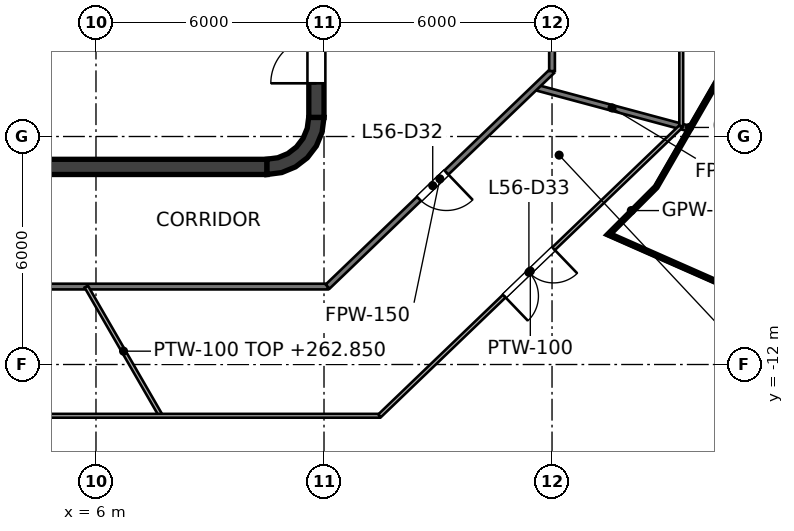
"""IFC4 building model, lengths in metres.
Left out: names, types, materials, properties, quantities, classifications, styles, units other than length and angle.
Written with IfcOpenShell. Run it as: python <this file> out.ifc"""

import sys

from ifc_helpers import new_model, si_unit, direction, frame, frame_2d, origin, place, context, subcontext, project, spatial, polyline, rectangle, outline, extrude, element, fill, save


model = new_model("IFC4")
c1 = context("Model", 3, precision=1e-05, world=origin(), true_north=direction((0.0, 1.0)))
c2 = subcontext(c1, "Body", "Model", "MODEL_VIEW")
j1 = project(units=[si_unit("LENGTHUNIT", "METRE"), si_unit("PLANEANGLEUNIT", "RADIAN")], contexts=[c1])
p1 = place(None, origin())
s1 = spatial("IfcSite", under=j1, at=p1, CompositionType="ELEMENT")
p2 = place(p1, origin())
s2 = spatial("IfcBuilding", under=s1, at=p2, CompositionType="ELEMENT")
p3 = place(p2, frame((0.0, 0.0, 259.0)))
s3 = spatial("IfcBuildingStorey", under=s2, at=p3, CompositionType="ELEMENT", Elevation=259.0)
p4 = place(p3, frame((-10.5, -6.8, 0.0), z_axis=(0.0, 0.0, 1.0), x_axis=(1.0, 0.0, 0.0)))
e1 = element("IfcWall", 1, at=p4, inside=s3, PredefinedType="SHEAR", context=c2, shape_type="SweptSolid", body=[
    extrude(rectangle(XDim=21.0, YDim=0.4, at=frame_2d((10.5, 0.0))), origin(), (0.0, 0.0, 1.0), 4.0),
])
p5 = place(p3, frame((11.8, -5.5, 0.0), z_axis=(0.0, 0.0, 1.0), x_axis=(0.0, 1.0, 0.0)))
e2 = element("IfcWall", 2, at=p5, inside=s3, PredefinedType="SHEAR", context=c2, shape_type="SweptSolid", body=[
    extrude(rectangle(XDim=11.0, YDim=0.4, at=frame_2d((5.5, 0.0))), origin(), (0.0, 0.0, 1.0), 4.0),
])
p6 = place(p5, frame((3.2, 0.0, 0.0)))
e3 = element("IfcOpeningElement", 3, at=p6, cuts=e2, PredefinedType="OPENING", context=c2, shape_type="SweptSolid", body=[
    extrude(rectangle(XDim=1.0, YDim=2.1, at=frame_2d((0.5, 1.05))), frame((0.0, 0.2, 0.0), z_axis=(0.0, -1.0, 0.0), x_axis=(1.0, 0.0, 0.0)), (0.0, 0.0, 1.0), 0.4),
])
p7 = place(p5, frame((6.1, 0.0, 0.0)))
e4 = element("IfcOpeningElement", 4, at=p7, cuts=e2, PredefinedType="OPENING", context=c2, shape_type="SweptSolid", body=[
    extrude(rectangle(XDim=1.0, YDim=2.1, at=frame_2d((0.5, 1.05))), frame((0.0, 0.2, 0.0), z_axis=(0.0, -1.0, 0.0), x_axis=(1.0, 0.0, 0.0)), (0.0, 0.0, 1.0), 0.4),
])
p8 = place(p5, frame((0.9, 0.0, 0.0)))
e5 = element("IfcOpeningElement", 5, at=p8, cuts=e2, PredefinedType="OPENING", context=c2, shape_type="SweptSolid", body=[
    extrude(rectangle(XDim=1.2, YDim=2.1, at=frame_2d((0.6, 1.05))), frame((0.0, 0.2, 0.0), z_axis=(0.0, -1.0, 0.0), x_axis=(1.0, 0.0, 0.0)), (0.0, 0.0, 1.0), 0.4),
])
p9 = place(p5, frame((8.9, 0.0, 0.0)))
e6 = element("IfcOpeningElement", 6, at=p9, cuts=e2, PredefinedType="OPENING", context=c2, shape_type="SweptSolid", body=[
    extrude(rectangle(XDim=1.2, YDim=2.1, at=frame_2d((0.6, 1.05))), frame((0.0, 0.2, 0.0), z_axis=(0.0, -1.0, 0.0), x_axis=(1.0, 0.0, 0.0)), (0.0, 0.0, 1.0), 0.4),
])
p10 = place(p3, origin())
e7 = element("IfcWall", 7, at=p10, inside=s3, PredefinedType="SHEAR", context=c2, shape_type="SweptSolid", body=[
    extrude(outline(polyline([(12.0, -5.5), (11.596, -5.5), (11.559, -5.784), (11.45, -6.048), (11.275, -6.275), (11.048, -6.45), (10.784, -6.559), (10.5, -6.596), (10.5, -7.0), (10.888, -6.949), (11.25, -6.799), (11.561, -6.561), (11.799, -6.25), (11.949, -5.888), (12.0, -5.5)])), origin(), (0.0, 0.0, 1.0), 4.0),
])
p11 = place(p3, frame((9.0, -6.6, 0.0), z_axis=(0.0, 0.0, 1.0), x_axis=(0.0, 1.0, 0.0)))
e8 = element("IfcWall", 8, at=p11, inside=s3, PredefinedType="SOLIDWALL", context=c2, shape_type="SweptSolid", body=[
    extrude(rectangle(XDim=2.5, YDim=0.25, at=frame_2d((1.25, 0.0))), origin(), (0.0, 0.0, 1.0), 3.85),
])
p12 = place(p11, frame((0.65, 0.0, 0.0)))
e9 = element("IfcOpeningElement", 9, at=p12, cuts=e8, PredefinedType="OPENING", context=c2, shape_type="SweptSolid", body=[
    extrude(rectangle(XDim=1.2, YDim=2.1, at=frame_2d((0.6, 1.05))), frame((0.0, 0.125, 0.0), z_axis=(0.0, -1.0, 0.0), x_axis=(1.0, 0.0, 0.0)), (0.0, 0.0, 1.0), 0.25),
])
p13 = place(p3, frame((3.275, -3.975, 0.0), z_axis=(0.0, 0.0, 1.0), x_axis=(1.0, 0.0, 0.0)))
e10 = element("IfcWall", 10, at=p13, inside=s3, PredefinedType="SOLIDWALL", context=c2, shape_type="SweptSolid", body=[
    extrude(rectangle(XDim=5.85, YDim=0.25, at=frame_2d((2.925, 0.0))), origin(), (0.0, 0.0, 1.0), 3.85),
])
for number, where, z_axis, x_axis in (
    (11, (5.9, -3.85, 0.0), (0.0, 0.0, 1.0), (0.0, 1.0, 0.0)),
    (12, (9.0, -3.85, 0.0), (0.0, 0.0, 1.0), (0.0, 1.0, 0.0)),
):
    element("IfcWall", number, at=place(p3, frame(where, z_axis=z_axis, x_axis=x_axis)), inside=s3, PredefinedType="SOLIDWALL", context=c2, shape_type="SweptSolid", body=[
        extrude(rectangle(XDim=2.2, YDim=0.25, at=frame_2d((1.1, 0.0))), origin(), (0.0, 0.0, 1.0), 3.85),
    ])
p14 = place(p3, frame((17.556, -4.704, 0.0), z_axis=(0.0, 0.0, 1.0), x_axis=(0.965793364166, -0.259312895424, 0.0)))
e13 = element("IfcWall", 13, at=p14, inside=s3, PredefinedType="PARTITIONING", context=c2, shape_type="SweptSolid", body=[
    extrude(rectangle(XDim=4.189, YDim=0.15, at=frame_2d((2.094, 0.0))), origin(), (0.0, 0.0, 1.0), 3.85),
])
p15 = place(p3, frame((-12.095, -9.949, 0.0), z_axis=(0.0, 0.0, 1.0), x_axis=(1.0, 0.0, 0.0)))
e14 = element("IfcWall", 14, at=p15, inside=s3, PredefinedType="PARTITIONING", context=c2, shape_type="SweptSolid", body=[
    extrude(rectangle(XDim=24.19, YDim=0.15, at=frame_2d((12.095, 0.0))), origin(), (0.0, 0.0, 1.0), 2.927),
])
p16 = place(p15, frame((4.086, 0.0, 0.0)))
e15 = element("IfcOpeningElement", 15, at=p16, cuts=e14, PredefinedType="OPENING", context=c2, shape_type="SweptSolid", body=[
    extrude(rectangle(XDim=1.0, YDim=2.1, at=frame_2d((0.5, 1.05))), frame((0.0, 0.075, 0.0), z_axis=(0.0, -1.0, 0.0), x_axis=(1.0, 0.0, 0.0)), (0.0, 0.0, 1.0), 0.15),
])
p17 = place(p15, frame((9.061, 0.0, 0.0)))
e16 = element("IfcOpeningElement", 16, at=p17, cuts=e14, PredefinedType="OPENING", context=c2, shape_type="SweptSolid", body=[
    extrude(rectangle(XDim=1.0, YDim=2.1, at=frame_2d((0.5, 1.05))), frame((0.0, 0.075, 0.0), z_axis=(0.0, -1.0, 0.0), x_axis=(1.0, 0.0, 0.0)), (0.0, 0.0, 1.0), 0.15),
])
p18 = place(p15, frame((14.417, 0.0, 0.0)))
e17 = element("IfcOpeningElement", 17, at=p18, cuts=e14, PredefinedType="OPENING", context=c2, shape_type="SweptSolid", body=[
    extrude(rectangle(XDim=1.0, YDim=2.1, at=frame_2d((0.5, 1.05))), frame((0.0, 0.075, 0.0), z_axis=(0.0, -1.0, 0.0), x_axis=(1.0, 0.0, 0.0)), (0.0, 0.0, 1.0), 0.15),
])
p19 = place(p3, frame((12.095, -9.949, 0.0), z_axis=(0.0, 0.0, 1.0), x_axis=(0.721348586031, 0.692572174889, 0.0)))
e18 = element("IfcWall", 18, at=p19, inside=s3, PredefinedType="PARTITIONING", context=c2, shape_type="SweptSolid", body=[
    extrude(rectangle(XDim=8.187, YDim=0.15, at=frame_2d((4.094, 0.0))), origin(), (0.0, 0.0, 1.0), 2.918),
])
p20 = place(p19, frame((3.334, 0.0, 0.0)))
e19 = element("IfcOpeningElement", 19, at=p20, cuts=e18, PredefinedType="OPENING", context=c2, shape_type="SweptSolid", body=[
    extrude(rectangle(XDim=1.0, YDim=2.1, at=frame_2d((0.5, 1.05))), frame((0.0, 0.075, 0.0), z_axis=(0.0, -1.0, 0.0), x_axis=(1.0, 0.0, 0.0)), (0.0, 0.0, 1.0), 0.15),
])
p21 = place(p3, frame((18.0, -4.278, 0.0), z_axis=(0.0, 0.0, 1.0), x_axis=(0.0, 1.0, 0.0)))
e20 = element("IfcWall", 20, at=p21, inside=s3, PredefinedType="PARTITIONING", context=c2, shape_type="SweptSolid", body=[
    extrude(rectangle(XDim=8.556, YDim=0.15, at=frame_2d((4.278, 0.0))), origin(), (0.0, 0.0, 1.0), 2.918),
])
p22 = place(p21, frame((2.111, 0.0, 0.0)))
e21 = element("IfcOpeningElement", 21, at=p22, cuts=e20, PredefinedType="OPENING", context=c2, shape_type="SweptSolid", body=[
    extrude(rectangle(XDim=1.0, YDim=2.1, at=frame_2d((0.5, 1.05))), frame((0.0, 0.075, 0.0), z_axis=(0.0, -1.0, 0.0), x_axis=(1.0, 0.0, 0.0)), (0.0, 0.0, 1.0), 0.15),
])
p23 = place(p3, frame((19.453, -8.583, 0.0), z_axis=(0.0, 0.0, 1.0), x_axis=(0.914941111659, -0.40358736625, 0.0)))
e22 = element("IfcWall", 22, at=p23, inside=s3, PredefinedType="PARTITIONING", context=c2, shape_type="SweptSolid", body=[
    extrude(rectangle(XDim=7.508, YDim=0.05, at=frame_2d((3.754, 0.0))), origin(), (0.0, 0.0, 1.0), 2.927),
])
p24 = place(p3, frame((19.453, -8.583, 0.0), z_axis=(0.0, 0.0, 1.0), x_axis=(0.706834345547, 0.707379111902, 0.0)))
e23 = element("IfcWall", 23, at=p24, inside=s3, PredefinedType="PARTITIONING", context=c2, shape_type="SweptSolid", body=[
    extrude(rectangle(XDim=1.793, YDim=0.05, at=frame_2d((0.896, 0.0))), origin(), (0.0, 0.0, 1.0), 2.927),
])
p25 = place(p3, frame((20.72, -7.315, 0.0), z_axis=(0.0, 0.0, 1.0), x_axis=(0.500032687935, 0.866006530574, 0.0)))
e24 = element("IfcWall", 24, at=p25, inside=s3, PredefinedType="PARTITIONING", context=c2, shape_type="SweptSolid", body=[
    extrude(rectangle(XDim=3.588, YDim=0.05, at=frame_2d((1.794, 0.0))), origin(), (0.0, 0.0, 1.0), 2.918),
])
p26 = place(p3, frame((5.744, -9.949, 0.0), z_axis=(0.0, 0.0, 1.0), x_axis=(0.500011323479, -0.866018866072, 0.0)))
e25 = element("IfcWall", 25, at=p26, inside=s3, PredefinedType="PARTITIONING", context=c2, shape_type="SweptSolid", body=[
    extrude(rectangle(XDim=3.926, YDim=0.1, at=frame_2d((1.963, 0.0))), origin(), (0.0, 0.0, 1.0), 3.85),
])
p27 = place(p3, frame((-13.349, -13.349, 0.0), z_axis=(0.0, 0.0, 1.0), x_axis=(1.0, 0.0, 0.0)))
e26 = element("IfcWall", 26, at=p27, inside=s3, PredefinedType="PARTITIONING", context=c2, shape_type="SweptSolid", body=[
    extrude(rectangle(XDim=26.812, YDim=0.1, at=frame_2d((13.406, 0.0))), origin(), (0.0, 0.0, 1.0), 2.927),
])
p28 = place(p27, frame((9.448, 0.0, 0.0)))
e27 = element("IfcOpeningElement", 27, at=p28, cuts=e26, PredefinedType="OPENING", context=c2, shape_type="SweptSolid", body=[
    extrude(rectangle(XDim=0.9, YDim=2.1, at=frame_2d((0.45, 1.05))), frame((0.0, 0.05, 0.0), z_axis=(0.0, -1.0, 0.0), x_axis=(1.0, 0.0, 0.0)), (0.0, 0.0, 1.0), 0.1),
])
p29 = place(p3, frame((13.463, -13.349, 0.0), z_axis=(0.0, 0.0, 1.0), x_axis=(0.721271070112, 0.692652902556, 0.0)))
e28 = element("IfcWall", 28, at=p29, inside=s3, PredefinedType="PARTITIONING", context=c2, shape_type="SweptSolid", body=[
    extrude(rectangle(XDim=10.996, YDim=0.1, at=frame_2d((5.498, 0.0))), origin(), (0.0, 0.0, 1.0), 2.927),
])
p30 = place(p29, frame((4.547, 0.0, 0.0)))
e29 = element("IfcOpeningElement", 29, at=p30, cuts=e28, PredefinedType="OPENING", context=c2, shape_type="SweptSolid", body=[
    extrude(rectangle(XDim=1.8, YDim=2.1, at=frame_2d((0.9, 1.05))), frame((0.0, 0.05, 0.0), z_axis=(0.0, -1.0, 0.0), x_axis=(1.0, 0.0, 0.0)), (0.0, 0.0, 1.0), 0.1),
])
p31 = place(p3, frame((21.4, -5.727, 0.0), z_axis=(0.0, 0.0, 1.0), x_axis=(0.0, 1.0, 0.0)))
e30 = element("IfcWall", 30, at=p31, inside=s3, PredefinedType="PARTITIONING", context=c2, shape_type="SweptSolid", body=[
    extrude(rectangle(XDim=11.454, YDim=0.1, at=frame_2d((5.727, 0.0))), origin(), (0.0, 0.0, 1.0), 2.918),
])
p32 = place(p12, origin())
e31 = element("IfcDoor", 31, at=p32, inside=s3, OperationType="SINGLE_SWING_LEFT", PredefinedType="DOOR", context=c2, shape_type="SweptSolid", body=[
    extrude(rectangle(XDim=1.2, YDim=2.1, at=frame_2d((0.6, 1.05))), frame((0.0, 0.025, 0.0), z_axis=(0.0, -1.0, 0.0), x_axis=(1.0, 0.0, 0.0)), (0.0, 0.0, 1.0), 0.05),
])
fill(e9, e31)
p33 = place(p8, origin())
e32 = element("IfcDoor", 32, at=p33, inside=s3, OperationType="SINGLE_SWING_LEFT", PredefinedType="DOOR", context=c2, shape_type="SweptSolid", body=[
    extrude(rectangle(XDim=1.2, YDim=2.1, at=frame_2d((0.6, 1.05))), frame((0.0, 0.025, 0.0), z_axis=(0.0, -1.0, 0.0), x_axis=(1.0, 0.0, 0.0)), (0.0, 0.0, 1.0), 0.05),
])
fill(e5, e32)
p34 = place(p20, origin())
e33 = element("IfcDoor", 33, at=p34, inside=s3, OperationType="SINGLE_SWING_RIGHT", PredefinedType="DOOR", context=c2, shape_type="SweptSolid", body=[
    extrude(rectangle(XDim=1.0, YDim=2.1, at=frame_2d((0.5, 1.05))), frame((0.0, 0.025, 0.0), z_axis=(0.0, -1.0, 0.0), x_axis=(1.0, 0.0, 0.0)), (0.0, 0.0, 1.0), 0.05),
])
fill(e19, e33)
p35 = place(p30, origin())
e34 = element("IfcDoor", 34, at=p35, inside=s3, OperationType="DOUBLE_DOOR_SINGLE_SWING", PredefinedType="DOOR", context=c2, shape_type="SweptSolid", body=[
    extrude(rectangle(XDim=1.8, YDim=2.1, at=frame_2d((0.9, 1.05))), frame((0.0, 0.025, 0.0), z_axis=(0.0, -1.0, 0.0), x_axis=(1.0, 0.0, 0.0)), (0.0, 0.0, 1.0), 0.05),
])
fill(e29, e34)
save(model, sys.argv[1])
